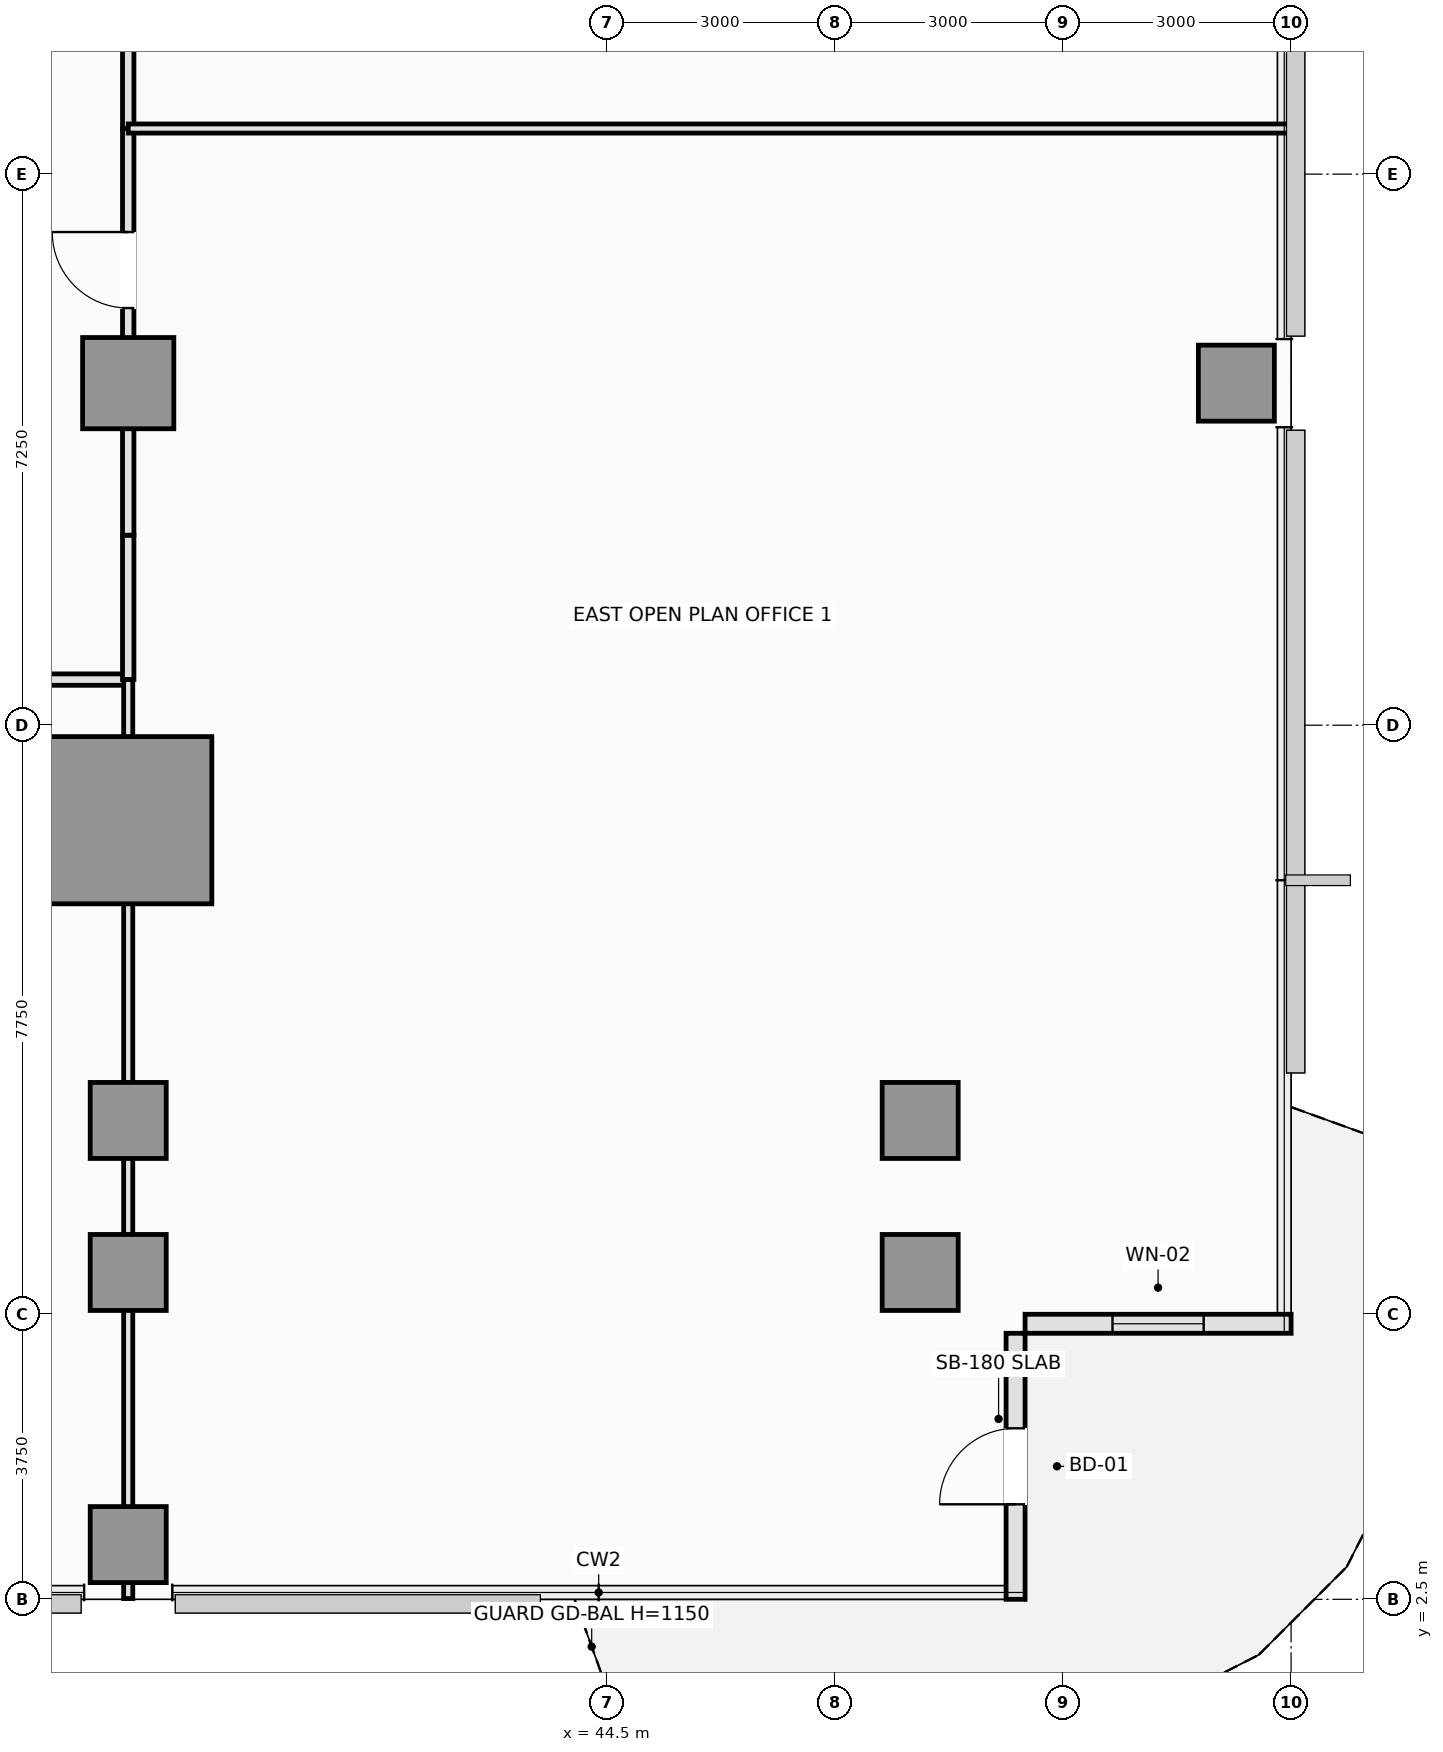
"""IFC4 building model, lengths in metres.
Left out: names, types, materials, properties, quantities, classifications, styles, units other than length and angle.
Written with IfcOpenShell. Run it as: python <this file> out.ifc"""

import sys

from ifc_helpers import new_model, si_unit, direction, frame, frame_2d, origin, origin_2d, place, context, subcontext, project, spatial, rectangle, extrude, element, fill, save


model = new_model("IFC4")
c1 = context("Model", 3, precision=1e-05, world=origin(), true_north=direction((0.0, 1.0)))
c2 = subcontext(c1, "Body", "Model", "MODEL_VIEW")
j1 = project(units=[si_unit("LENGTHUNIT", "METRE"), si_unit("PLANEANGLEUNIT", "RADIAN")], contexts=[c1])
p1 = place(None, origin())
s1 = spatial("IfcSite", under=j1, at=p1, CompositionType="ELEMENT")
p2 = place(p1, origin())
s2 = spatial("IfcBuilding", under=s1, at=p2, CompositionType="ELEMENT")
p3 = place(p2, frame((0.0, 0.0, 57.55)))
s3 = spatial("IfcBuildingStorey", under=s2, at=p3, CompositionType="ELEMENT", Elevation=57.55)
p4 = place(p3, frame((38.2, 12.75, 0.0), z_axis=(0.0, 0.0, 1.0), x_axis=(1.0, 0.0, 0.0)))
e1 = element("IfcColumn", 1, at=p4, inside=s3, PredefinedType="COLUMN", context=c2, shape_type="SweptSolid", body=[
    extrude(rectangle(XDim=2.2, YDim=2.2, at=origin_2d()), origin(), (0.0, 0.0, 1.0), 3.55),
])
p5 = place(p3, frame((38.2, 18.5, 0.0), z_axis=(0.0, 0.0, 1.0), x_axis=(1.0, 0.0, 0.0)))
e2 = element("IfcColumn", 2, at=p5, inside=s3, PredefinedType="COLUMN", context=c2, shape_type="SweptSolid", body=[
    extrude(rectangle(XDim=1.2, YDim=1.2, at=origin_2d()), origin(), (0.0, 0.0, 1.0), 3.55),
])
for number, where, z_axis, x_axis in (
    (3, (48.62, 6.8, 0.0), (0.0, 0.0, 1.0), (1.0, 0.0, 0.0)),
    (4, (38.2, 6.8, 0.0), (0.0, 0.0, 1.0), (1.0, 0.0, 0.0)),
    (5, (38.2, 8.8, 0.0), (0.0, 0.0, 1.0), (1.0, 0.0, 0.0)),
    (6, (48.62, 8.8, 0.0), (0.0, 0.0, 1.0), (1.0, 0.0, 0.0)),
    (7, (52.78, 18.5, 0.0), (0.0, 0.0, 1.0), (1.0, 0.0, 0.0)),
    (8, (38.2, 3.22, 0.0), (0.0, 0.0, 1.0), (1.0, 0.0, 0.0)),
):
    element("IfcColumn", number, at=place(p3, frame(where, z_axis=z_axis, x_axis=x_axis)), inside=s3, PredefinedType="COLUMN", context=c2, shape_type="SweptSolid", body=[
        extrude(rectangle(XDim=1.0, YDim=1.0, at=origin_2d()), origin(), (0.0, 0.0, 1.0), 3.55),
    ])
p6 = place(p3, frame((49.875, 2.5, 0.0), z_axis=(0.0, 0.0, 1.0), x_axis=(0.0, 1.0, 0.0)))
e9 = element("IfcWall", 9, at=p6, inside=s3, PredefinedType="SOLIDWALL", context=c2, shape_type="SweptSolid", body=[
    extrude(rectangle(XDim=3.5, YDim=0.25, at=frame_2d((1.75, 0.0))), origin(), (0.0, 0.0, 1.0), 3.07),
])
p7 = place(p6, frame((1.25, 0.0, 0.0)))
e10 = element("IfcOpeningElement", 10, at=p7, cuts=e9, PredefinedType="OPENING", context=c2, shape_type="SweptSolid", body=[
    extrude(rectangle(XDim=1.0, YDim=2.2, at=frame_2d((0.5, 1.1))), frame((0.0, 0.135, 0.0), z_axis=(0.0, -1.0, 0.0), x_axis=(1.0, 0.0, 0.0)), (0.0, 0.0, 1.0), 0.27),
])
p8 = place(p3, frame((50.0, 6.125, 0.0), z_axis=(0.0, 0.0, 1.0), x_axis=(1.0, 0.0, 0.0)))
e11 = element("IfcWall", 11, at=p8, inside=s3, PredefinedType="SOLIDWALL", context=c2, shape_type="SweptSolid", body=[
    extrude(rectangle(XDim=3.5, YDim=0.25, at=frame_2d((1.75, 0.0))), origin(), (0.0, 0.0, 1.0), 3.07),
])
p9 = place(p8, frame((1.15, 0.0, 0.9)))
e12 = element("IfcOpeningElement", 12, at=p9, cuts=e11, PredefinedType="OPENING", context=c2, shape_type="SweptSolid", body=[
    extrude(rectangle(XDim=1.2, YDim=1.8, at=frame_2d((0.6, 0.9))), frame((0.0, 0.135, 0.0), z_axis=(0.0, -1.0, 0.0), x_axis=(1.0, 0.0, 0.0)), (0.0, 0.0, 1.0), 0.27),
])
p10 = place(p3, frame((33.0, 14.6, 0.0), z_axis=(0.0, 0.0, 1.0), x_axis=(1.0, 0.0, 0.0)))
e13 = element("IfcWall", 13, at=p10, inside=s3, PredefinedType="PARTITIONING", context=c2, shape_type="SweptSolid", body=[
    extrude(rectangle(XDim=5.2, YDim=0.15, at=frame_2d((2.6, 0.0))), origin(), (0.0, 0.0, 1.0), 3.37),
])
p11 = place(p10, frame((2.1, 0.0, 0.0)))
e14 = element("IfcOpeningElement", 14, at=p11, cuts=e13, PredefinedType="OPENING", context=c2, shape_type="SweptSolid", body=[
    extrude(rectangle(XDim=1.0, YDim=2.15, at=frame_2d((0.5, 1.075))), frame((0.0, 0.085, 0.0), z_axis=(0.0, -1.0, 0.0), x_axis=(1.0, 0.0, 0.0)), (0.0, 0.0, 1.0), 0.17),
])
p12 = place(p3, frame((38.2, 14.6, 0.0), z_axis=(0.0, 0.0, 1.0), x_axis=(0.0, 1.0, 0.0)))
e15 = element("IfcWall", 15, at=p12, inside=s3, PredefinedType="PARTITIONING", context=c2, shape_type="SweptSolid", body=[
    extrude(rectangle(XDim=1.9, YDim=0.15, at=frame_2d((0.95, 0.0))), origin(), (0.0, 0.0, 1.0), 2.82),
])
p13 = place(p3, frame((38.2, 16.5, 0.0), z_axis=(0.0, 0.0, 1.0), x_axis=(0.0, 1.0, 0.0)))
e16 = element("IfcWall", 16, at=p13, inside=s3, PredefinedType="PARTITIONING", context=c2, shape_type="SweptSolid", body=[
    extrude(rectangle(XDim=5.35, YDim=0.15, at=frame_2d((2.675, 0.0))), origin(), (0.0, 0.0, 1.0), 2.82),
])
p14 = place(p13, frame((2.988, 0.0, 0.0)))
e17 = element("IfcOpeningElement", 17, at=p14, cuts=e16, PredefinedType="OPENING", context=c2, shape_type="SweptSolid", body=[
    extrude(rectangle(XDim=1.0, YDim=2.15, at=frame_2d((0.5, 1.075))), frame((0.0, 0.085, 0.0), z_axis=(0.0, -1.0, 0.0), x_axis=(1.0, 0.0, 0.0)), (0.0, 0.0, 1.0), 0.17),
])
p15 = place(p3, frame((38.2, 21.85, 0.0), z_axis=(0.0, 0.0, 1.0), x_axis=(0.0, 1.0, 0.0)))
e18 = element("IfcWall", 18, at=p15, inside=s3, PredefinedType="PARTITIONING", context=c2, shape_type="SweptSolid", body=[
    extrude(rectangle(XDim=3.4, YDim=0.15, at=frame_2d((1.7, 0.0))), origin(), (0.0, 0.0, 1.0), 2.82),
])
p16 = place(p15, frame((1.2, 0.0, 0.0)))
e19 = element("IfcOpeningElement", 19, at=p16, cuts=e18, PredefinedType="OPENING", context=c2, shape_type="SweptSolid", body=[
    extrude(rectangle(XDim=1.0, YDim=2.15, at=frame_2d((0.5, 1.075))), frame((0.0, 0.085, 0.0), z_axis=(0.0, -1.0, 0.0), x_axis=(1.0, 0.0, 0.0)), (0.0, 0.0, 1.0), 0.17),
])
p17 = place(p3, frame((38.2, 2.51, 0.0), z_axis=(0.0, 0.0, 1.0), x_axis=(0.0, 1.0, 0.0)))
e20 = element("IfcWall", 20, at=p17, inside=s3, PredefinedType="PARTITIONING", context=c2, shape_type="SweptSolid", body=[
    extrude(rectangle(XDim=12.09, YDim=0.12, at=frame_2d((6.045, 0.0))), origin(), (0.0, 0.0, 1.0), 2.82),
])
p18 = place(p3, frame((38.2, 21.85, 0.0), z_axis=(0.0, 0.0, 1.0), x_axis=(1.0, 0.0, 0.0)))
e21 = element("IfcWall", 21, at=p18, inside=s3, PredefinedType="PARTITIONING", context=c2, shape_type="SweptSolid", body=[
    extrude(rectangle(XDim=15.29, YDim=0.12, at=frame_2d((7.645, 0.0))), origin(), (0.0, 0.0, 1.0), 3.37),
])
p19 = place(p7, frame((1.0, 0.0, 0.0), z_axis=(0.0, 0.0, 1.0), x_axis=(-1.0, 0.0, 0.0)))
e22 = element("IfcDoor", 22, at=p19, inside=s3, OperationType="SINGLE_SWING_LEFT", PredefinedType="DOOR", context=c2, shape_type="SweptSolid", body=[
    extrude(rectangle(XDim=1.0, YDim=2.2, at=frame_2d((0.5, 1.1))), frame((0.0, 0.025, 0.0), z_axis=(0.0, -1.0, 0.0), x_axis=(1.0, 0.0, 0.0)), (0.0, 0.0, 1.0), 0.05),
])
fill(e10, e22)
p20 = place(p9, origin())
e23 = element("IfcWindow", 23, at=p20, inside=s3, PartitioningType="SINGLE_PANEL", PredefinedType="WINDOW", context=c2, shape_type="SweptSolid", body=[
    extrude(rectangle(XDim=1.2, YDim=1.8, at=frame_2d((0.6, 0.9))), frame((0.0, 0.03, 0.0), z_axis=(0.0, -1.0, 0.0), x_axis=(1.0, 0.0, 0.0)), (0.0, 0.0, 1.0), 0.06),
])
fill(e12, e23)
p21 = place(p14, origin())
e24 = element("IfcDoor", 24, at=p21, inside=s3, OperationType="SINGLE_SWING_RIGHT", PredefinedType="DOOR", context=c2, shape_type="SweptSolid", body=[
    extrude(rectangle(XDim=1.0, YDim=2.15, at=frame_2d((0.5, 1.075))), frame((0.0, 0.025, 0.0), z_axis=(0.0, -1.0, 0.0), x_axis=(1.0, 0.0, 0.0)), (0.0, 0.0, 1.0), 0.05),
])
fill(e17, e24)
save(model, sys.argv[1])
